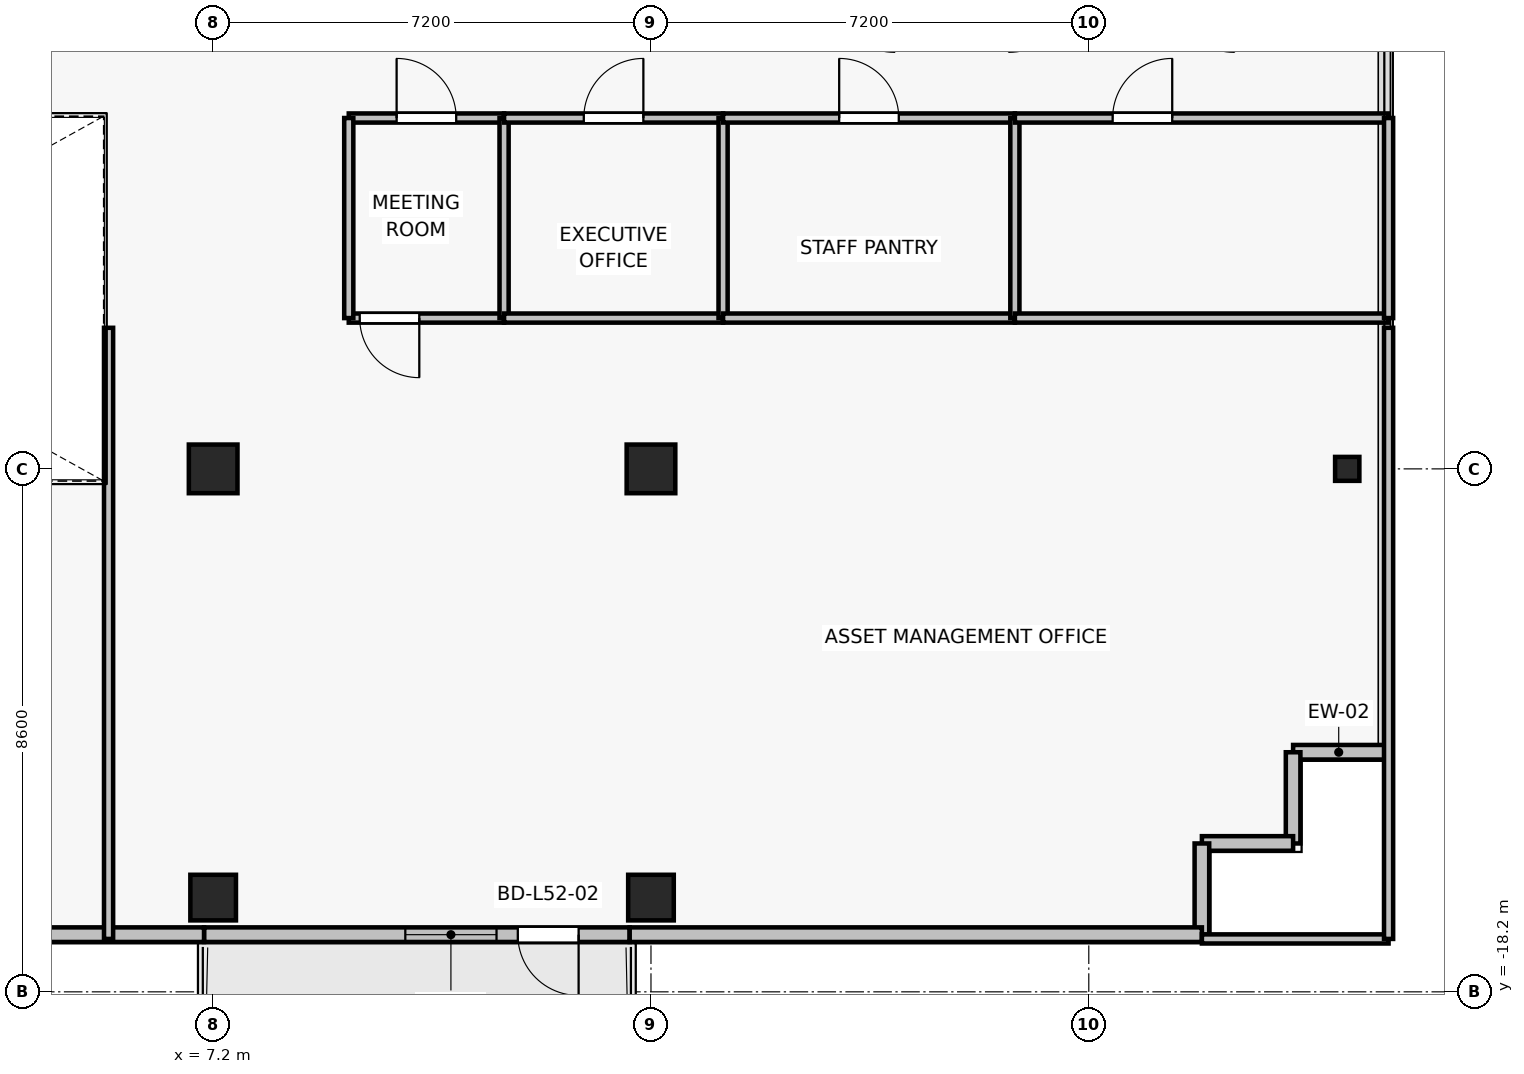
"""IFC4 building model, lengths in metres.
Left out: names, types, materials, properties, quantities, classifications, styles, units other than length and angle.
Written with IfcOpenShell. Run it as: python <this file> out.ifc"""

import sys

from ifc_helpers import new_model, si_unit, direction, frame, frame_2d, origin, origin_2d, place, context, subcontext, project, spatial, rectangle, i_section, extrude, source, transform, mapped, element, fill, save


model = new_model("IFC4")
c1 = context("Model", 3, precision=1e-05, world=origin(), true_north=direction((0.0, 1.0)))
c2 = subcontext(c1, "Body", "Model", "MODEL_VIEW")
j1 = project(units=[si_unit("LENGTHUNIT", "METRE"), si_unit("PLANEANGLEUNIT", "RADIAN")], contexts=[c1])
p1 = place(None, origin())
s1 = spatial("IfcSite", under=j1, at=p1, CompositionType="ELEMENT")
p2 = place(p1, origin())
s2 = spatial("IfcBuilding", under=s1, at=p2, CompositionType="ELEMENT")
p3 = place(p2, frame((0.0, 0.0, 185.8)))
s3 = spatial("IfcBuildingStorey", under=s2, at=p3, CompositionType="ELEMENT", Elevation=185.8)
for number, where, z_axis, x_axis in (
    (1, (7.2, -9.6, 0.0), (0.0, 0.0, 1.0), (1.0, 0.0, 0.0)),
    (2, (14.4, -9.6, 0.0), (0.0, 0.0, 1.0), (1.0, 0.0, 0.0)),
):
    element("IfcColumn", number, at=place(p3, frame(where, z_axis=z_axis, x_axis=x_axis)), inside=s3, PredefinedType="COLUMN", context=c2, shape_type="SweptSolid", body=[
        extrude(rectangle(XDim=0.8, YDim=0.8, at=origin_2d()), origin(), (0.0, 0.0, 1.0), 3.3),
    ])
for number, where, z_axis, x_axis in (
    (3, (7.2, -16.65, 0.0), (0.0, 0.0, 1.0), (1.0, 0.0, 0.0)),
    (4, (14.4, -16.65, 0.0), (0.0, 0.0, 1.0), (1.0, 0.0, 0.0)),
):
    element("IfcColumn", number, at=place(p3, frame(where, z_axis=z_axis, x_axis=x_axis)), inside=s3, PredefinedType="COLUMN", context=c2, shape_type="SweptSolid", body=[
        extrude(rectangle(XDim=0.75, YDim=0.75, at=origin_2d()), origin(), (0.0, 0.0, 1.0), 3.3),
    ])
p4 = place(p3, frame((25.85, -9.6, 0.0), z_axis=(0.0, 0.0, 1.0), x_axis=(1.0, 0.0, 0.0)))
e5 = element("IfcColumn", 5, at=p4, inside=s3, PredefinedType="COLUMN", context=c2, shape_type="SweptSolid", body=[
    extrude(i_section(OverallWidth=0.399, OverallDepth=0.394, WebThickness=0.023, FlangeThickness=0.037, FilletRadius=0.015, at=origin_2d()), origin(), (0.0, 0.0, 1.0), 3.3),
])
p5 = place(p3, frame((14.05, -17.26, 0.0), z_axis=(0.0, 0.0, 1.0), x_axis=(-1.0, 0.0, 0.0)))
e6 = element("IfcWall", 6, at=p5, inside=s3, PredefinedType="SOLIDWALL", context=c2, shape_type="SweptSolid", body=[
    extrude(rectangle(XDim=7.0, YDim=0.24, at=frame_2d((3.5, 0.0))), origin(), (0.0, 0.0, 1.0), 2.665),
])
p6 = place(p5, frame((0.84, 0.0, 0.0)))
e7 = element("IfcOpeningElement", 7, at=p6, cuts=e6, PredefinedType="OPENING", context=c2, shape_type="SweptSolid", body=[
    extrude(rectangle(XDim=1.0, YDim=2.2, at=frame_2d((0.5, 1.1))), frame((0.0, 0.13, 0.0), z_axis=(0.0, -1.0, 0.0), x_axis=(1.0, 0.0, 0.0)), (0.0, 0.0, 1.0), 0.26),
])
p7 = place(p5, frame((2.19, 0.0, 0.85)))
e8 = element("IfcOpeningElement", 8, at=p7, cuts=e6, PredefinedType="OPENING", context=c2, shape_type="SweptSolid", body=[
    extrude(rectangle(XDim=1.5, YDim=1.6, at=frame_2d((0.75, 0.8))), frame((0.0, 0.13, 0.0), z_axis=(0.0, -1.0, 0.0), x_axis=(1.0, 0.0, 0.0)), (0.0, 0.0, 1.0), 0.26),
])
for number, where, z_axis, x_axis in (
    (9, (24.96, -14.26, 0.0), (0.0, 0.0, 1.0), (1.0, 0.0, 0.0)),
    (10, (24.96, -15.76, 0.0), (0.0, 0.0, 1.0), (0.0, 1.0, 0.0)),
    (11, (23.46, -15.76, 0.0), (0.0, 0.0, 1.0), (1.0, 0.0, 0.0)),
    (12, (23.46, -17.26, 0.0), (0.0, 0.0, 1.0), (0.0, 1.0, 0.0)),
):
    element("IfcWall", number, at=place(p3, frame(where, z_axis=z_axis, x_axis=x_axis)), inside=s3, PredefinedType="SOLIDWALL", context=c2, shape_type="SweptSolid", body=[
        extrude(rectangle(XDim=1.5, YDim=0.24, at=frame_2d((0.75, 0.0))), origin(), (0.0, 0.0, 1.0), 3.075),
    ])
p8 = place(p3, frame((14.05, -17.26, 0.0), z_axis=(0.0, 0.0, 1.0), x_axis=(1.0, 0.0, 0.0)))
e13 = element("IfcWall", 13, at=p8, inside=s3, PredefinedType="SOLIDWALL", context=c2, shape_type="SweptSolid", body=[
    extrude(rectangle(XDim=9.41, YDim=0.24, at=frame_2d((4.705, 0.0))), origin(), (0.0, 0.0, 1.0), 3.075),
])
p9 = place(p3, frame((3.2, -17.26, 0.0), z_axis=(0.0, 0.0, 1.0), x_axis=(1.0, 0.0, 0.0)))
e14 = element("IfcWall", 14, at=p9, inside=s3, PredefinedType="SOLIDWALL", context=c2, shape_type="SweptSolid", body=[
    extrude(rectangle(XDim=3.85, YDim=0.24, at=frame_2d((1.925, 0.0))), origin(), (0.0, 0.0, 1.0), 3.075),
])
p10 = place(p3, frame((11.984, -7.12, 0.0), z_axis=(0.0, 0.0, 1.0), x_axis=(-1.0, 0.0, 0.0)))
e15 = element("IfcWall", 15, at=p10, inside=s3, PredefinedType="PARTITIONING", context=c2, shape_type="SweptSolid", body=[
    extrude(rectangle(XDim=2.554, YDim=0.15, at=frame_2d((1.277, 0.0))), origin(), (0.0, 0.0, 1.0), 3.075),
])
p11 = place(p10, frame((1.394, 0.0, 0.0)))
e16 = element("IfcOpeningElement", 16, at=p11, cuts=e15, PredefinedType="OPENING", context=c2, shape_type="SweptSolid", body=[
    extrude(rectangle(XDim=0.98, YDim=2.15, at=frame_2d((0.49, 1.075))), frame((0.0, 0.085, 0.0), z_axis=(0.0, -1.0, 0.0), x_axis=(1.0, 0.0, 0.0)), (0.0, 0.0, 1.0), 0.17),
])
p12 = place(p3, frame((9.43, -3.83, 0.0), z_axis=(0.0, 0.0, 1.0), x_axis=(1.0, 0.0, 0.0)))
e17 = element("IfcWall", 17, at=p12, inside=s3, PredefinedType="PARTITIONING", context=c2, shape_type="SweptSolid", body=[
    extrude(rectangle(XDim=2.554, YDim=0.15, at=frame_2d((1.277, 0.0))), origin(), (0.0, 0.0, 1.0), 3.075),
])
p13 = place(p12, frame((0.787, 0.0, 0.0)))
e18 = element("IfcOpeningElement", 18, at=p13, cuts=e17, PredefinedType="OPENING", context=c2, shape_type="SweptSolid", body=[
    extrude(rectangle(XDim=0.98, YDim=2.15, at=frame_2d((0.49, 1.075))), frame((0.0, 0.085, 0.0), z_axis=(0.0, -1.0, 0.0), x_axis=(1.0, 0.0, 0.0)), (0.0, 0.0, 1.0), 0.17),
])
for number, where, z_axis, x_axis in (
    (19, (9.43, -7.12, 0.0), (0.0, 0.0, 1.0), (0.0, 1.0, 0.0)),
    (20, (11.984, -3.83, 0.0), (0.0, 0.0, 1.0), (0.0, -1.0, 0.0)),
):
    element("IfcWall", number, at=place(p3, frame(where, z_axis=z_axis, x_axis=x_axis)), inside=s3, PredefinedType="PARTITIONING", context=c2, shape_type="SweptSolid", body=[
        extrude(rectangle(XDim=3.29, YDim=0.15, at=frame_2d((1.645, 0.0))), origin(), (0.0, 0.0, 1.0), 2.665),
    ])
p14 = place(p3, frame((15.586, -7.12, 0.0), z_axis=(0.0, 0.0, 1.0), x_axis=(-1.0, 0.0, 0.0)))
e21 = element("IfcWall", 21, at=p14, inside=s3, PredefinedType="PARTITIONING", context=c2, shape_type="SweptSolid", body=[
    extrude(rectangle(XDim=3.602, YDim=0.15, at=frame_2d((1.801, 0.0))), origin(), (0.0, 0.0, 1.0), 2.565),
])
p15 = place(p3, frame((11.984, -3.83, 0.0), z_axis=(0.0, 0.0, 1.0), x_axis=(1.0, 0.0, 0.0)))
e22 = element("IfcWall", 22, at=p15, inside=s3, PredefinedType="PARTITIONING", context=c2, shape_type="SweptSolid", body=[
    extrude(rectangle(XDim=3.602, YDim=0.15, at=frame_2d((1.801, 0.0))), origin(), (0.0, 0.0, 1.0), 2.565),
])
p16 = place(p15, frame((1.311, 0.0, 0.0)))
e23 = element("IfcOpeningElement", 23, at=p16, cuts=e22, PredefinedType="OPENING", context=c2, shape_type="SweptSolid", body=[
    extrude(rectangle(XDim=0.98, YDim=2.15, at=frame_2d((0.49, 1.075))), frame((0.0, 0.085, 0.0), z_axis=(0.0, -1.0, 0.0), x_axis=(1.0, 0.0, 0.0)), (0.0, 0.0, 1.0), 0.17),
])
p17 = place(p3, frame((15.586, -3.83, 0.0), z_axis=(0.0, 0.0, 1.0), x_axis=(0.0, -1.0, 0.0)))
e24 = element("IfcWall", 24, at=p17, inside=s3, PredefinedType="PARTITIONING", context=c2, shape_type="SweptSolid", body=[
    extrude(rectangle(XDim=3.29, YDim=0.15, at=frame_2d((1.645, 0.0))), origin(), (0.0, 0.0, 1.0), 3.075),
])
p18 = place(p3, frame((20.385, -7.12, 0.0), z_axis=(0.0, 0.0, 1.0), x_axis=(-1.0, 0.0, 0.0)))
e25 = element("IfcWall", 25, at=p18, inside=s3, PredefinedType="PARTITIONING", context=c2, shape_type="SweptSolid", body=[
    extrude(rectangle(XDim=4.799, YDim=0.15, at=frame_2d((2.399, 0.0))), origin(), (0.0, 0.0, 1.0), 3.075),
])
p19 = place(p3, frame((15.586, -3.83, 0.0), z_axis=(0.0, 0.0, 1.0), x_axis=(1.0, 0.0, 0.0)))
e26 = element("IfcWall", 26, at=p19, inside=s3, PredefinedType="PARTITIONING", context=c2, shape_type="SweptSolid", body=[
    extrude(rectangle(XDim=4.799, YDim=0.15, at=frame_2d((2.399, 0.0))), origin(), (0.0, 0.0, 1.0), 3.075),
])
p20 = place(p19, frame((1.909, 0.0, 0.0)))
e27 = element("IfcOpeningElement", 27, at=p20, cuts=e26, PredefinedType="OPENING", context=c2, shape_type="SweptSolid", body=[
    extrude(rectangle(XDim=0.98, YDim=2.15, at=frame_2d((0.49, 1.075))), frame((0.0, 0.085, 0.0), z_axis=(0.0, -1.0, 0.0), x_axis=(1.0, 0.0, 0.0)), (0.0, 0.0, 1.0), 0.17),
])
p21 = place(p3, frame((20.385, -3.83, 0.0), z_axis=(0.0, 0.0, 1.0), x_axis=(0.0, -1.0, 0.0)))
e28 = element("IfcWall", 28, at=p21, inside=s3, PredefinedType="PARTITIONING", context=c2, shape_type="SweptSolid", body=[
    extrude(rectangle(XDim=3.29, YDim=0.15, at=frame_2d((1.645, 0.0))), origin(), (0.0, 0.0, 1.0), 3.075),
])
p22 = place(p3, frame((26.53, -7.12, 0.0), z_axis=(0.0, 0.0, 1.0), x_axis=(-1.0, 0.0, 0.0)))
e29 = element("IfcWall", 29, at=p22, inside=s3, PredefinedType="PARTITIONING", context=c2, shape_type="SweptSolid", body=[
    extrude(rectangle(XDim=6.146, YDim=0.15, at=frame_2d((3.073, 0.0))), origin(), (0.0, 0.0, 1.0), 2.565),
])
p23 = place(p3, frame((20.385, -3.83, 0.0), z_axis=(0.0, 0.0, 1.0), x_axis=(1.0, 0.0, 0.0)))
e30 = element("IfcWall", 30, at=p23, inside=s3, PredefinedType="PARTITIONING", context=c2, shape_type="SweptSolid", body=[
    extrude(rectangle(XDim=6.146, YDim=0.15, at=frame_2d((3.073, 0.0))), origin(), (0.0, 0.0, 1.0), 2.565),
])
p24 = place(p23, frame((1.607, 0.0, 0.0)))
e31 = element("IfcOpeningElement", 31, at=p24, cuts=e30, PredefinedType="OPENING", context=c2, shape_type="SweptSolid", body=[
    extrude(rectangle(XDim=0.98, YDim=2.15, at=frame_2d((0.49, 1.075))), frame((0.0, 0.085, 0.0), z_axis=(0.0, -1.0, 0.0), x_axis=(1.0, 0.0, 0.0)), (0.0, 0.0, 1.0), 0.17),
])
p25 = place(p3, frame((26.53, -3.83, 0.0), z_axis=(0.0, 0.0, 1.0), x_axis=(0.0, -1.0, 0.0)))
e32 = element("IfcWall", 32, at=p25, inside=s3, PredefinedType="PARTITIONING", context=c2, shape_type="SweptSolid", body=[
    extrude(rectangle(XDim=3.29, YDim=0.15, at=frame_2d((1.645, 0.0))), origin(), (0.0, 0.0, 1.0), 3.075),
])
p26 = place(p3, frame((26.53, -17.33, 0.0), z_axis=(0.0, 0.0, 1.0), x_axis=(-1.0, 0.0, 0.0)))
e33 = element("IfcWall", 33, at=p26, inside=s3, PredefinedType="PARTITIONING", context=c2, shape_type="SweptSolid", body=[
    extrude(rectangle(XDim=3.07, YDim=0.15, at=frame_2d((1.535, 0.0))), origin(), (0.0, 0.0, 1.0), 2.665),
])
p27 = place(p3, frame((5.48, -17.33, 0.0), z_axis=(0.0, 0.0, 1.0), x_axis=(0.0, 1.0, 0.0)))
e34 = element("IfcWall", 34, at=p27, inside=s3, PredefinedType="PARTITIONING", context=c2, shape_type="SweptSolid", body=[
    extrude(rectangle(XDim=10.05, YDim=0.15, at=frame_2d((5.025, 0.0))), origin(), (0.0, 0.0, 1.0), 2.565),
])
p28 = place(p3, frame((26.53, -7.28, 0.0), z_axis=(0.0, 0.0, 1.0), x_axis=(0.0, -1.0, 0.0)))
e35 = element("IfcWall", 35, at=p28, inside=s3, PredefinedType="PARTITIONING", context=c2, shape_type="SweptSolid", body=[
    extrude(rectangle(XDim=10.05, YDim=0.15, at=frame_2d((5.025, 0.0))), origin(), (0.0, 0.0, 1.0), 2.665),
])
m1 = source(origin(), c2, "Body", "SweptSolid", [
    extrude(rectangle(XDim=1.0, YDim=2.2, at=frame_2d((0.5, 1.1))), frame((0.0, 0.025, 0.0), z_axis=(0.0, -1.0, 0.0), x_axis=(1.0, 0.0, 0.0)), (0.0, 0.0, 1.0), 0.05),
])
p29 = place(p6, origin())
e36 = element("IfcDoor", 36, at=p29, inside=s3, OperationType="SINGLE_SWING_LEFT", PredefinedType="DOOR", context=c2, shape_type="MappedRepresentation", body=[
    mapped(m1, transform((0.0, 0.0, 0.0), x_axis=(1.0, 0.0, 0.0), y_axis=(0.0, 1.0, 0.0), z_axis=(0.0, 0.0, 1.0), scale=1.0)),
])
fill(e7, e36)
m2 = source(origin(), c2, "Body", "SweptSolid", [
    extrude(rectangle(XDim=1.5, YDim=1.6, at=frame_2d((0.75, 0.8))), frame((0.0, 0.03, 0.0), z_axis=(0.0, -1.0, 0.0), x_axis=(1.0, 0.0, 0.0)), (0.0, 0.0, 1.0), 0.06),
])
p30 = place(p7, origin())
e37 = element("IfcWindow", 37, at=p30, inside=s3, PartitioningType="SINGLE_PANEL", PredefinedType="WINDOW", context=c2, shape_type="MappedRepresentation", body=[
    mapped(m2, transform((0.0, 0.0, 0.0), x_axis=(1.0, 0.0, 0.0), y_axis=(0.0, 1.0, 0.0), z_axis=(0.0, 0.0, 1.0), scale=1.0)),
])
fill(e8, e37)
m3 = source(origin(), c2, "Body", "SweptSolid", [
    extrude(rectangle(XDim=0.98, YDim=2.15, at=frame_2d((0.49, 1.075))), frame((0.0, 0.025, 0.0), z_axis=(0.0, -1.0, 0.0), x_axis=(1.0, 0.0, 0.0)), (0.0, 0.0, 1.0), 0.05),
])
p31 = place(p13, origin())
e38 = element("IfcDoor", 38, at=p31, inside=s3, OperationType="SINGLE_SWING_LEFT", PredefinedType="DOOR", context=c2, shape_type="MappedRepresentation", body=[
    mapped(m3, transform((0.0, 0.0, 0.0), x_axis=(1.0, 0.0, 0.0), y_axis=(0.0, 1.0, 0.0), z_axis=(0.0, 0.0, 1.0), scale=1.0)),
])
fill(e18, e38)
p32 = place(p16, origin())
e39 = element("IfcDoor", 39, at=p32, inside=s3, OperationType="SINGLE_SWING_RIGHT", PredefinedType="DOOR", context=c2, shape_type="MappedRepresentation", body=[
    mapped(m3, transform((0.0, 0.0, 0.0), x_axis=(1.0, 0.0, 0.0), y_axis=(0.0, 1.0, 0.0), z_axis=(0.0, 0.0, 1.0), scale=1.0)),
])
fill(e23, e39)
p33 = place(p20, origin())
e40 = element("IfcDoor", 40, at=p33, inside=s3, OperationType="SINGLE_SWING_LEFT", PredefinedType="DOOR", context=c2, shape_type="MappedRepresentation", body=[
    mapped(m3, transform((0.0, 0.0, 0.0), x_axis=(1.0, 0.0, 0.0), y_axis=(0.0, 1.0, 0.0), z_axis=(0.0, 0.0, 1.0), scale=1.0)),
])
fill(e27, e40)
p34 = place(p24, origin())
e41 = element("IfcDoor", 41, at=p34, inside=s3, OperationType="SINGLE_SWING_RIGHT", PredefinedType="DOOR", context=c2, shape_type="MappedRepresentation", body=[
    mapped(m3, transform((0.0, 0.0, 0.0), x_axis=(1.0, 0.0, 0.0), y_axis=(0.0, 1.0, 0.0), z_axis=(0.0, 0.0, 1.0), scale=1.0)),
])
fill(e31, e41)
p35 = place(p11, origin())
e42 = element("IfcDoor", 42, at=p35, inside=s3, OperationType="SINGLE_SWING_LEFT", PredefinedType="DOOR", context=c2, shape_type="MappedRepresentation", body=[
    mapped(m3, transform((0.0, 0.0, 0.0), x_axis=(1.0, 0.0, 0.0), y_axis=(0.0, 1.0, 0.0), z_axis=(0.0, 0.0, 1.0), scale=1.0)),
])
fill(e16, e42)
save(model, sys.argv[1])
